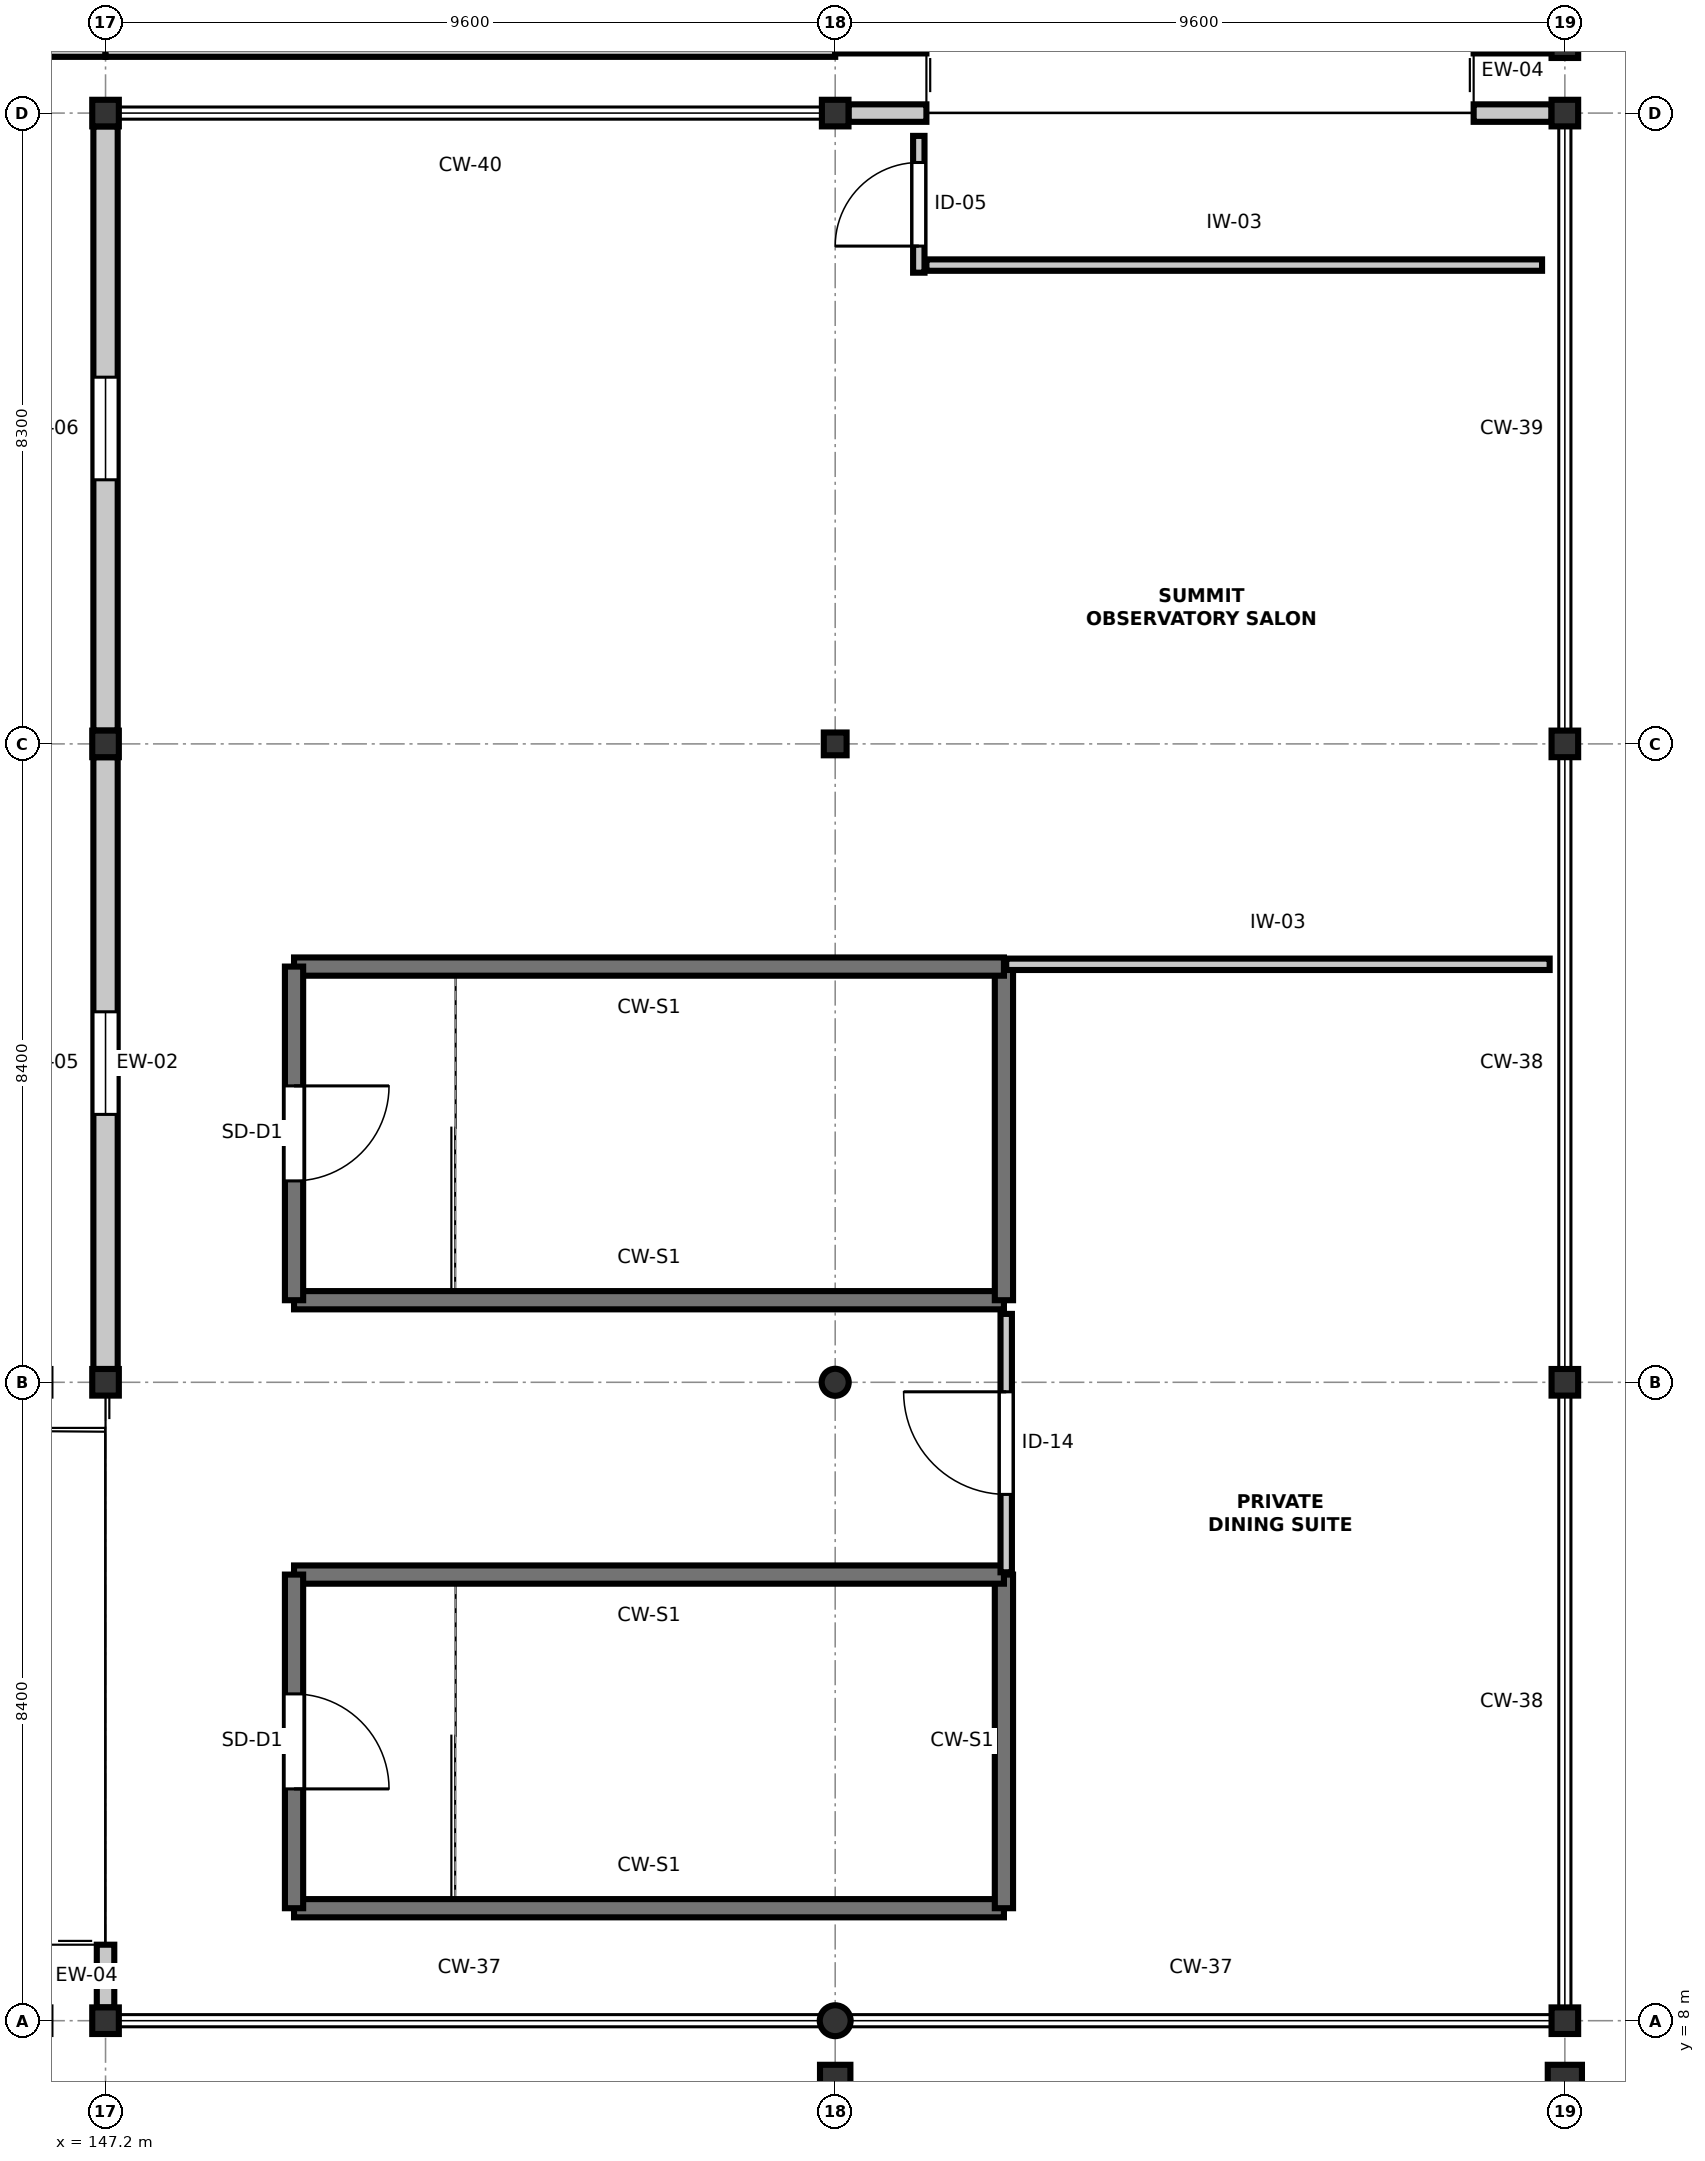
"""IFC4 building model, lengths in metres.
Left out: names, types, materials, properties, quantities, classifications, styles, units other than length and angle.
Written with IfcOpenShell. Run it as: python <this file> out.ifc"""

import sys

from ifc_helpers import new_model, si_unit, direction, frame, frame_2d, origin, origin_2d, place, context, subcontext, project, spatial, rectangle, hollow_rectangle, hollow_circle, i_section, extrude, element, fill, save


model = new_model("IFC4")
c1 = context("Model", 3, precision=1e-05, world=origin(), true_north=direction((0.0, 1.0)))
c2 = subcontext(c1, "Body", "Model", "MODEL_VIEW")
j1 = project(units=[si_unit("LENGTHUNIT", "METRE"), si_unit("PLANEANGLEUNIT", "RADIAN")], contexts=[c1])
p1 = place(None, origin())
s1 = spatial("IfcSite", under=j1, at=p1, CompositionType="ELEMENT")
p2 = place(p1, origin())
s2 = spatial("IfcBuilding", under=s1, at=p2, CompositionType="ELEMENT")
p3 = place(p2, frame((0.0, 0.0, 24.6)))
s3 = spatial("IfcBuildingStorey", under=s2, at=p3, CompositionType="ELEMENT", Elevation=24.6)
for number, where, z_axis, x_axis in (
    (1, (147.2, 8.0, 0.0), (0.0, 0.0, 1.0), (1.0, 0.0, 0.0)),
    (2, (147.2, 16.4, 0.0), (0.0, 0.0, 1.0), (1.0, 0.0, 0.0)),
    (3, (147.2, 24.8, 0.0), (0.0, 0.0, 1.0), (1.0, 0.0, 0.0)),
    (4, (147.2, 33.1, 0.0), (0.0, 0.0, 1.0), (1.0, 0.0, 0.0)),
):
    element("IfcColumn", number, at=place(p3, frame(where, z_axis=z_axis, x_axis=x_axis)), inside=s3, PredefinedType="COLUMN", context=c2, shape_type="SweptSolid", body=[
        extrude(i_section(OverallWidth=0.35, OverallDepth=0.35, WebThickness=0.012, FlangeThickness=0.019, FilletRadius=0.02, at=origin_2d()), origin(), (0.0, 0.0, 1.0), 5.62),
    ])
p4 = place(p3, frame((156.8, 8.0, 0.0), z_axis=(0.0, 0.0, 1.0), x_axis=(1.0, 0.0, 0.0)))
e5 = element("IfcColumn", 5, at=p4, inside=s3, PredefinedType="COLUMN", context=c2, shape_type="SweptSolid", body=[
    extrude(hollow_circle(Radius=0.203, WallThickness=0.016, at=origin_2d()), origin(), (0.0, 0.0, 1.0), 8.02),
])
p5 = place(p3, frame((156.8, 7.095, 0.0), z_axis=(0.0, 0.0, 1.0), x_axis=(1.0, 0.0, 0.0)))
e6 = element("IfcColumn", 6, at=p5, inside=s3, PredefinedType="PILASTER", context=c2, shape_type="SweptSolid", body=[
    extrude(rectangle(XDim=0.4, YDim=0.65, at=origin_2d()), origin(), (0.0, 0.0, 1.0), 5.5),
])
p6 = place(p3, frame((156.8, 16.4, 0.0), z_axis=(0.0, 0.0, 1.0), x_axis=(1.0, 0.0, 0.0)))
e7 = element("IfcColumn", 7, at=p6, inside=s3, PredefinedType="COLUMN", context=c2, shape_type="SweptSolid", body=[
    extrude(hollow_circle(Radius=0.178, WallThickness=0.012, at=origin_2d()), origin(), (0.0, 0.0, 1.0), 8.02),
])
p7 = place(p3, frame((156.8, 24.8, 0.0), z_axis=(0.0, 0.0, 1.0), x_axis=(1.0, 0.0, 0.0)))
e8 = element("IfcColumn", 8, at=p7, inside=s3, PredefinedType="COLUMN", context=c2, shape_type="SweptSolid", body=[
    extrude(hollow_rectangle(XDim=0.3, YDim=0.3, WallThickness=0.012, InnerFilletRadius=0.012, OuterFilletRadius=0.024, at=origin_2d()), origin(), (0.0, 0.0, 1.0), 8.02),
])
p8 = place(p3, frame((156.8, 33.1, 0.0), z_axis=(0.0, 0.0, 1.0), x_axis=(1.0, 0.0, 0.0)))
e9 = element("IfcColumn", 9, at=p8, inside=s3, PredefinedType="COLUMN", context=c2, shape_type="SweptSolid", body=[
    extrude(i_section(OverallWidth=0.35, OverallDepth=0.35, WebThickness=0.012, FlangeThickness=0.019, FilletRadius=0.02, at=origin_2d()), origin(), (0.0, 0.0, 1.0), 8.02),
])
p9 = place(p3, frame((166.4, 8.0, 0.0), z_axis=(0.0, 0.0, 1.0), x_axis=(1.0, 0.0, 0.0)))
e10 = element("IfcColumn", 10, at=p9, inside=s3, PredefinedType="COLUMN", context=c2, shape_type="SweptSolid", body=[
    extrude(i_section(OverallWidth=0.35, OverallDepth=0.35, WebThickness=0.012, FlangeThickness=0.019, FilletRadius=0.02, at=origin_2d()), origin(), (0.0, 0.0, 1.0), 5.62),
])
p10 = place(p3, frame((166.4, 7.045, 0.0), z_axis=(0.0, 0.0, 1.0), x_axis=(1.0, 0.0, 0.0)))
e11 = element("IfcColumn", 11, at=p10, inside=s3, PredefinedType="PILASTER", context=c2, shape_type="SweptSolid", body=[
    extrude(rectangle(XDim=0.45, YDim=0.75, at=origin_2d()), origin(), (0.0, 0.0, 1.0), 5.5),
])
for number, where, z_axis, x_axis in (
    (12, (166.4, 16.4, 0.0), (0.0, 0.0, 1.0), (1.0, 0.0, 0.0)),
    (13, (166.4, 24.8, 0.0), (0.0, 0.0, 1.0), (1.0, 0.0, 0.0)),
    (14, (166.4, 33.1, 0.0), (0.0, 0.0, 1.0), (1.0, 0.0, 0.0)),
):
    element("IfcColumn", number, at=place(p3, frame(where, z_axis=z_axis, x_axis=x_axis)), inside=s3, PredefinedType="COLUMN", context=c2, shape_type="SweptSolid", body=[
        extrude(i_section(OverallWidth=0.35, OverallDepth=0.35, WebThickness=0.012, FlangeThickness=0.019, FilletRadius=0.02, at=origin_2d()), origin(), (0.0, 0.0, 1.0), 5.62),
    ])
p11 = place(p3, frame((166.4, 34.0, 0.0), z_axis=(0.0, 0.0, 1.0), x_axis=(1.0, 0.0, 0.0)))
e15 = element("IfcColumn", 15, at=p11, inside=s3, PredefinedType="COLUMN", context=c2, shape_type="SweptSolid", body=[
    extrude(i_section(OverallWidth=0.35, OverallDepth=0.35, WebThickness=0.012, FlangeThickness=0.019, FilletRadius=0.02, at=origin_2d()), origin(), (0.0, 0.0, 1.0), 3.282),
])
p12 = place(p3, frame((156.975, 33.1, 0.0), z_axis=(0.0, 0.0, 1.0), x_axis=(1.0, 0.0, 0.0)))
e16 = element("IfcWall", 16, at=p12, inside=s3, PredefinedType="STANDARD", context=c2, shape_type="SweptSolid", body=[
    extrude(rectangle(XDim=1.025, YDim=0.23, at=frame_2d((0.512, 0.0))), origin(), (0.0, 0.0, 1.0), 5.05),
])
p13 = place(p3, frame((165.2, 33.1, 0.0), z_axis=(0.0, 0.0, 1.0), x_axis=(1.0, 0.0, 0.0)))
e17 = element("IfcWall", 17, at=p13, inside=s3, PredefinedType="STANDARD", context=c2, shape_type="SweptSolid", body=[
    extrude(rectangle(XDim=1.025, YDim=0.23, at=frame_2d((0.513, 0.0))), origin(), (0.0, 0.0, 1.0), 5.05),
])
p14 = place(p3, frame((147.2, 8.175, 0.0), z_axis=(0.0, 0.0, 1.0), x_axis=(0.0, 1.0, 0.0)))
e18 = element("IfcWall", 18, at=p14, inside=s3, PredefinedType="STANDARD", context=c2, shape_type="SweptSolid", body=[
    extrude(rectangle(XDim=0.825, YDim=0.23, at=frame_2d((0.413, 0.0))), origin(), (0.0, 0.0, 1.0), 5.05),
])
p15 = place(p3, frame((147.2, 24.625, 0.0), z_axis=(0.0, 0.0, 1.0), x_axis=(0.0, -1.0, 0.0)))
e19 = element("IfcWall", 19, at=p15, inside=s3, PredefinedType="STANDARD", context=c2, shape_type="SweptSolid", body=[
    extrude(rectangle(XDim=8.05, YDim=0.32, at=frame_2d((4.025, 0.0))), origin(), (0.0, 0.0, 1.0), 5.05),
])
p16 = place(p15, frame((3.35, 0.0, 0.95)))
e20 = element("IfcOpeningElement", 20, at=p16, cuts=e19, PredefinedType="OPENING", context=c2, shape_type="SweptSolid", body=[
    extrude(rectangle(XDim=1.35, YDim=1.45, at=frame_2d((0.675, 0.725))), frame((0.0, 0.17, 0.0), z_axis=(0.0, -1.0, 0.0), x_axis=(1.0, 0.0, 0.0)), (0.0, 0.0, 1.0), 0.34),
])
p17 = place(p3, frame((147.2, 32.925, 0.0), z_axis=(0.0, 0.0, 1.0), x_axis=(0.0, -1.0, 0.0)))
e21 = element("IfcWall", 21, at=p17, inside=s3, PredefinedType="STANDARD", context=c2, shape_type="SweptSolid", body=[
    extrude(rectangle(XDim=7.95, YDim=0.32, at=frame_2d((3.975, 0.0))), origin(), (0.0, 0.0, 1.0), 5.05),
])
p18 = place(p17, frame((3.3, 0.0, 0.95)))
e22 = element("IfcOpeningElement", 22, at=p18, cuts=e21, PredefinedType="OPENING", context=c2, shape_type="SweptSolid", body=[
    extrude(rectangle(XDim=1.35, YDim=1.7, at=frame_2d((0.675, 0.85))), frame((0.0, 0.17, 0.0), z_axis=(0.0, -1.0, 0.0), x_axis=(1.0, 0.0, 0.0)), (0.0, 0.0, 1.0), 0.34),
])
p19 = place(p3, frame((137.775, 34.0, 0.0), z_axis=(0.0, 0.0, 1.0), x_axis=(1.0, 0.0, 0.0)))
e23 = element("IfcWall", 23, at=p19, inside=s3, PredefinedType="STANDARD", context=c2, shape_type="SweptSolid", body=[
    extrude(rectangle(XDim=9.425, YDim=0.32, at=frame_2d((4.712, 0.0))), origin(), (0.0, 0.0, 1.0), 2.35),
])
p20 = place(p3, frame((147.2, 34.0, 0.0), z_axis=(0.0, 0.0, 1.0), x_axis=(1.0, 0.0, 0.0)))
e24 = element("IfcWall", 24, at=p20, inside=s3, PredefinedType="STANDARD", context=c2, shape_type="SweptSolid", body=[
    extrude(rectangle(XDim=9.6, YDim=0.32, at=frame_2d((4.8, 0.0))), origin(), (0.0, 0.0, 1.0), 2.35),
])
p21 = place(p3, frame((156.8, 34.0, 0.0), z_axis=(0.0, 0.0, 1.0), x_axis=(1.0, 0.0, 0.0)))
e25 = element("IfcWall", 25, at=p21, inside=s3, PredefinedType="STANDARD", context=c2, shape_type="SweptSolid", body=[
    extrude(rectangle(XDim=1.2, YDim=0.23, at=frame_2d((0.6, 0.0))), origin(), (0.0, 0.0, 1.0), 2.35),
])
p22 = place(p3, frame((165.2, 34.0, 0.0), z_axis=(0.0, 0.0, 1.0), x_axis=(1.0, 0.0, 0.0)))
e26 = element("IfcWall", 26, at=p22, inside=s3, PredefinedType="STANDARD", context=c2, shape_type="SweptSolid", body=[
    extrude(rectangle(XDim=1.025, YDim=0.23, at=frame_2d((0.513, 0.0))), origin(), (0.0, 0.0, 1.0), 2.35),
])
p23 = place(p3, frame((149.68, 9.48, 0.0), z_axis=(0.0, 0.0, 1.0), x_axis=(1.0, 0.0, 0.0)))
e27 = element("IfcWall", 27, at=p23, inside=s3, PredefinedType="SHEAR", context=c2, shape_type="SweptSolid", body=[
    extrude(rectangle(XDim=9.34, YDim=0.24, at=frame_2d((4.67, 0.0))), origin(), (0.0, 0.0, 1.0), 5.2),
])
p24 = place(p3, frame((159.02, 9.48, 0.0), z_axis=(0.0, 0.0, 1.0), x_axis=(0.0, 1.0, 0.0)))
e28 = element("IfcWall", 28, at=p24, inside=s3, PredefinedType="SHEAR", context=c2, shape_type="SweptSolid", body=[
    extrude(rectangle(XDim=4.39, YDim=0.24, at=frame_2d((2.195, 0.0))), origin(), (0.0, 0.0, 1.0), 5.2),
])
p25 = place(p3, frame((159.02, 13.87, 0.0), z_axis=(0.0, 0.0, 1.0), x_axis=(-1.0, 0.0, 0.0)))
e29 = element("IfcWall", 29, at=p25, inside=s3, PredefinedType="SHEAR", context=c2, shape_type="SweptSolid", body=[
    extrude(rectangle(XDim=9.34, YDim=0.24, at=frame_2d((4.67, 0.0))), origin(), (0.0, 0.0, 1.0), 5.2),
])
p26 = place(p3, frame((149.68, 13.87, 0.0), z_axis=(0.0, 0.0, 1.0), x_axis=(0.0, -1.0, 0.0)))
e30 = element("IfcWall", 30, at=p26, inside=s3, PredefinedType="SHEAR", context=c2, shape_type="SweptSolid", body=[
    extrude(rectangle(XDim=4.39, YDim=0.24, at=frame_2d((2.195, 0.0))), origin(), (0.0, 0.0, 1.0), 5.2),
])
p27 = place(p26, frame((1.57, 0.0, 0.0)))
e31 = element("IfcOpeningElement", 31, at=p27, cuts=e30, PredefinedType="OPENING", context=c2, shape_type="SweptSolid", body=[
    extrude(rectangle(XDim=1.25, YDim=2.2, at=frame_2d((0.625, 1.1))), frame((0.0, 0.13, 0.0), z_axis=(0.0, -1.0, 0.0), x_axis=(1.0, 0.0, 0.0)), (0.0, 0.0, 1.0), 0.26),
])
p28 = place(p3, frame((149.68, 17.48, 0.0), z_axis=(0.0, 0.0, 1.0), x_axis=(1.0, 0.0, 0.0)))
e32 = element("IfcWall", 32, at=p28, inside=s3, PredefinedType="SHEAR", context=c2, shape_type="SweptSolid", body=[
    extrude(rectangle(XDim=9.34, YDim=0.24, at=frame_2d((4.67, 0.0))), origin(), (0.0, 0.0, 1.0), 5.2),
])
p29 = place(p3, frame((159.02, 17.48, 0.0), z_axis=(0.0, 0.0, 1.0), x_axis=(0.0, 1.0, 0.0)))
e33 = element("IfcWall", 33, at=p29, inside=s3, PredefinedType="SHEAR", context=c2, shape_type="SweptSolid", body=[
    extrude(rectangle(XDim=4.39, YDim=0.24, at=frame_2d((2.195, 0.0))), origin(), (0.0, 0.0, 1.0), 5.2),
])
p30 = place(p3, frame((159.02, 21.87, 0.0), z_axis=(0.0, 0.0, 1.0), x_axis=(-1.0, 0.0, 0.0)))
e34 = element("IfcWall", 34, at=p30, inside=s3, PredefinedType="SHEAR", context=c2, shape_type="SweptSolid", body=[
    extrude(rectangle(XDim=9.34, YDim=0.24, at=frame_2d((4.67, 0.0))), origin(), (0.0, 0.0, 1.0), 5.2),
])
p31 = place(p3, frame((149.68, 21.87, 0.0), z_axis=(0.0, 0.0, 1.0), x_axis=(0.0, -1.0, 0.0)))
e35 = element("IfcWall", 35, at=p31, inside=s3, PredefinedType="SHEAR", context=c2, shape_type="SweptSolid", body=[
    extrude(rectangle(XDim=4.39, YDim=0.24, at=frame_2d((2.195, 0.0))), origin(), (0.0, 0.0, 1.0), 5.2),
])
p32 = place(p31, frame((1.57, 0.0, 0.0)))
e36 = element("IfcOpeningElement", 36, at=p32, cuts=e35, PredefinedType="OPENING", context=c2, shape_type="SweptSolid", body=[
    extrude(rectangle(XDim=1.25, YDim=2.2, at=frame_2d((0.625, 1.1))), frame((0.0, 0.13, 0.0), z_axis=(0.0, -1.0, 0.0), x_axis=(1.0, 0.0, 0.0)), (0.0, 0.0, 1.0), 0.26),
])
p33 = place(p3, frame((157.9, 31.0, 0.0), z_axis=(0.0, 0.0, 1.0), x_axis=(0.0, 1.0, 0.0)))
e37 = element("IfcWall", 37, at=p33, inside=s3, PredefinedType="PARTITIONING", context=c2, shape_type="SweptSolid", body=[
    extrude(rectangle(XDim=1.8, YDim=0.15, at=frame_2d((0.9, 0.0))), origin(), (0.0, 0.0, 1.0), 4.0),
])
p34 = place(p33, frame((0.35, 0.0, 0.0)))
e38 = element("IfcOpeningElement", 38, at=p34, cuts=e37, PredefinedType="OPENING", context=c2, shape_type="SweptSolid", body=[
    extrude(rectangle(XDim=1.1, YDim=2.15, at=frame_2d((0.55, 1.075))), frame((0.0, 0.085, 0.0), z_axis=(0.0, -1.0, 0.0), x_axis=(1.0, 0.0, 0.0)), (0.0, 0.0, 1.0), 0.17),
])
p35 = place(p3, frame((158.0, 31.1, 0.0), z_axis=(0.0, 0.0, 1.0), x_axis=(1.0, 0.0, 0.0)))
e39 = element("IfcWall", 39, at=p35, inside=s3, PredefinedType="PARTITIONING", context=c2, shape_type="SweptSolid", body=[
    extrude(rectangle(XDim=8.1, YDim=0.15, at=frame_2d((4.05, 0.0))), origin(), (0.0, 0.0, 1.0), 4.0),
])
p36 = place(p3, frame((159.05, 13.9, 0.0), z_axis=(0.0, 0.0, 1.0), x_axis=(0.0, 1.0, 0.0)))
e40 = element("IfcWall", 40, at=p36, inside=s3, PredefinedType="PARTITIONING", context=c2, shape_type="SweptSolid", body=[
    extrude(rectangle(XDim=3.4, YDim=0.15, at=frame_2d((1.7, 0.0))), origin(), (0.0, 0.0, 1.0), 4.0),
])
p37 = place(p36, frame((1.025, 0.0, 0.0)))
e41 = element("IfcOpeningElement", 41, at=p37, cuts=e40, PredefinedType="OPENING", context=c2, shape_type="SweptSolid", body=[
    extrude(rectangle(XDim=1.35, YDim=2.18, at=frame_2d((0.675, 1.09))), frame((0.0, 0.085, 0.0), z_axis=(0.0, -1.0, 0.0), x_axis=(1.0, 0.0, 0.0)), (0.0, 0.0, 1.0), 0.17),
])
p38 = place(p3, frame((159.05, 21.9, 0.0), z_axis=(0.0, 0.0, 1.0), x_axis=(1.0, 0.0, 0.0)))
e42 = element("IfcWall", 42, at=p38, inside=s3, PredefinedType="PARTITIONING", context=c2, shape_type="SweptSolid", body=[
    extrude(rectangle(XDim=7.15, YDim=0.15, at=frame_2d((3.575, 0.0))), origin(), (0.0, 0.0, 1.0), 4.0),
])
p39 = place(p16, origin())
e43 = element("IfcWindow", 43, at=p39, inside=s3, PartitioningType="SINGLE_PANEL", PredefinedType="WINDOW", context=c2, shape_type="SweptSolid", body=[
    extrude(rectangle(XDim=1.35, YDim=1.45, at=frame_2d((0.675, 0.725))), frame((0.0, 0.03, 0.0), z_axis=(0.0, -1.0, 0.0), x_axis=(1.0, 0.0, 0.0)), (0.0, 0.0, 1.0), 0.06),
])
fill(e20, e43)
p40 = place(p18, origin())
e44 = element("IfcWindow", 44, at=p40, inside=s3, PartitioningType="SINGLE_PANEL", PredefinedType="WINDOW", context=c2, shape_type="SweptSolid", body=[
    extrude(rectangle(XDim=1.35, YDim=1.7, at=frame_2d((0.675, 0.85))), frame((0.0, 0.03, 0.0), z_axis=(0.0, -1.0, 0.0), x_axis=(1.0, 0.0, 0.0)), (0.0, 0.0, 1.0), 0.06),
])
fill(e22, e44)
p41 = place(p27, origin())
e45 = element("IfcDoor", 45, at=p41, inside=s3, OperationType="SINGLE_SWING_RIGHT", PredefinedType="DOOR", context=c2, shape_type="SweptSolid", body=[
    extrude(rectangle(XDim=1.25, YDim=2.2, at=frame_2d((0.625, 1.1))), frame((0.0, 0.025, 0.0), z_axis=(0.0, -1.0, 0.0), x_axis=(1.0, 0.0, 0.0)), (0.0, 0.0, 1.0), 0.05),
])
fill(e31, e45)
p42 = place(p32, origin())
e46 = element("IfcDoor", 46, at=p42, inside=s3, OperationType="SINGLE_SWING_LEFT", PredefinedType="DOOR", context=c2, shape_type="SweptSolid", body=[
    extrude(rectangle(XDim=1.25, YDim=2.2, at=frame_2d((0.625, 1.1))), frame((0.0, 0.025, 0.0), z_axis=(0.0, -1.0, 0.0), x_axis=(1.0, 0.0, 0.0)), (0.0, 0.0, 1.0), 0.05),
])
fill(e36, e46)
p43 = place(p34, origin())
e47 = element("IfcDoor", 47, at=p43, inside=s3, OperationType="SINGLE_SWING_LEFT", PredefinedType="DOOR", context=c2, shape_type="SweptSolid", body=[
    extrude(rectangle(XDim=1.1, YDim=2.15, at=frame_2d((0.55, 1.075))), frame((0.0, 0.025, 0.0), z_axis=(0.0, -1.0, 0.0), x_axis=(1.0, 0.0, 0.0)), (0.0, 0.0, 1.0), 0.05),
])
fill(e38, e47)
p44 = place(p37, origin())
e48 = element("IfcDoor", 48, at=p44, inside=s3, OperationType="SINGLE_SWING_RIGHT", PredefinedType="DOOR", context=c2, shape_type="SweptSolid", body=[
    extrude(rectangle(XDim=1.35, YDim=2.18, at=frame_2d((0.675, 1.09))), frame((0.0, 0.025, 0.0), z_axis=(0.0, -1.0, 0.0), x_axis=(1.0, 0.0, 0.0)), (0.0, 0.0, 1.0), 0.05),
])
fill(e41, e48)
save(model, sys.argv[1])
